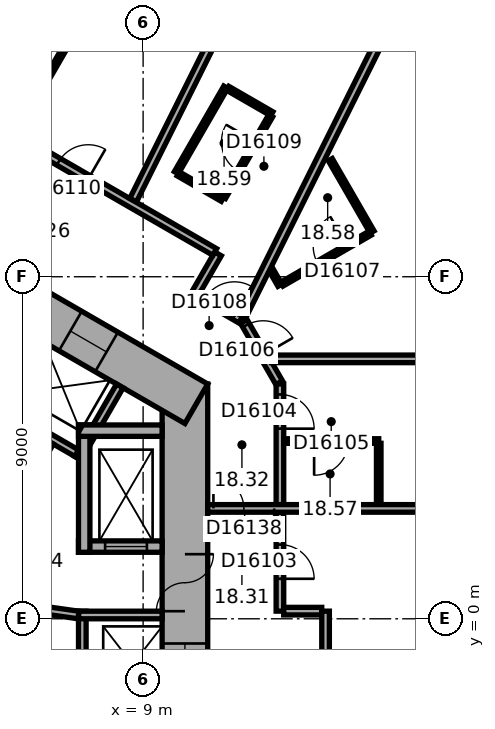
"""IFC4 building model, lengths in metres.
Left out: names, types, materials, properties, quantities, classifications, styles, units other than length and angle.
Written with IfcOpenShell. Run it as: python <this file> out.ifc"""

import sys

from ifc_helpers import new_model, si_unit, direction, frame, frame_2d, origin, place, context, subcontext, project, spatial, rectangle, extrude, element, fill, save


model = new_model("IFC4")
c1 = context("Model", 3, precision=1e-05, world=origin(), true_north=direction((0.0, 1.0)))
c2 = subcontext(c1, "Body", "Model", "MODEL_VIEW")
j1 = project(units=[si_unit("LENGTHUNIT", "METRE"), si_unit("PLANEANGLEUNIT", "RADIAN")], contexts=[c1])
p1 = place(None, origin())
s1 = spatial("IfcSite", under=j1, at=p1, CompositionType="ELEMENT")
p2 = place(p1, origin())
s2 = spatial("IfcBuilding", under=s1, at=p2, CompositionType="ELEMENT")
p3 = place(p2, frame((0.0, 0.0, 83.6)))
s3 = spatial("IfcBuildingStorey", under=s2, at=p3, CompositionType="ELEMENT", Elevation=83.6)
p4 = place(p3, frame((10.1, -6.177, 0.0), z_axis=(0.0, 0.0, 1.0), x_axis=(0.0, 1.0, 0.0)))
e1 = element("IfcWall", 1, at=p4, inside=s3, PredefinedType="SHEAR", context=c2, shape_type="SweptSolid", body=[
    extrude(rectangle(XDim=12.355, YDim=1.2, at=frame_2d((6.177, 0.0))), origin(), (0.0, 0.0, 1.0), 3.3),
])
p5 = place(p4, frame((6.378, 0.0, 0.0)))
e2 = element("IfcOpeningElement", 2, at=p5, cuts=e1, PredefinedType="OPENING", context=c2, shape_type="SweptSolid", body=[
    extrude(rectangle(XDim=1.5, YDim=2.1, at=frame_2d((0.75, 1.05))), frame((0.0, 0.61, 0.0), z_axis=(0.0, -1.0, 0.0), x_axis=(1.0, 0.0, 0.0)), (0.0, 0.0, 1.0), 1.22),
])
p6 = place(p4, frame((1.828, 0.0, 0.0)))
e3 = element("IfcOpeningElement", 3, at=p6, cuts=e1, PredefinedType="OPENING", context=c2, shape_type="SweptSolid", body=[
    extrude(rectangle(XDim=1.1, YDim=2.1, at=frame_2d((0.55, 1.05))), frame((0.0, 0.61, 0.0), z_axis=(0.0, -1.0, 0.0), x_axis=(1.0, 0.0, 0.0)), (0.0, 0.0, 1.0), 1.22),
])
p7 = place(p4, frame((4.427, 0.0, 0.0)))
e4 = element("IfcOpeningElement", 4, at=p7, cuts=e1, PredefinedType="OPENING", context=c2, shape_type="SweptSolid", body=[
    extrude(rectangle(XDim=1.1, YDim=2.1, at=frame_2d((0.55, 1.05))), frame((0.0, 0.61, 0.0), z_axis=(0.0, -1.0, 0.0), x_axis=(1.0, 0.0, 0.0)), (0.0, 0.0, 1.0), 1.22),
])
p8 = place(p3, frame((10.4, 5.658, 0.0), z_axis=(0.0, 0.0, 1.0), x_axis=(-0.866021384402, 0.500006961711, 0.0)))
e5 = element("IfcWall", 5, at=p8, inside=s3, PredefinedType="SHEAR", context=c2, shape_type="SweptSolid", body=[
    extrude(rectangle(XDim=12.355, YDim=1.2, at=frame_2d((6.178, 0.0))), origin(), (0.0, 0.0, 1.0), 3.3),
])
p9 = place(p8, frame((2.728, 0.0, 0.0)))
e6 = element("IfcOpeningElement", 6, at=p9, cuts=e5, PredefinedType="OPENING", context=c2, shape_type="SweptSolid", body=[
    extrude(rectangle(XDim=1.1, YDim=2.1, at=frame_2d((0.55, 1.05))), frame((0.0, 0.61, 0.0), z_axis=(0.0, -1.0, 0.0), x_axis=(1.0, 0.0, 0.0)), (0.0, 0.0, 1.0), 1.22),
])
p10 = place(p8, frame((5.328, 0.0, 0.0)))
e7 = element("IfcOpeningElement", 7, at=p10, cuts=e5, PredefinedType="OPENING", context=c2, shape_type="SweptSolid", body=[
    extrude(rectangle(XDim=1.1, YDim=2.1, at=frame_2d((0.55, 1.05))), frame((0.0, 0.61, 0.0), z_axis=(0.0, -1.0, 0.0), x_axis=(1.0, 0.0, 0.0)), (0.0, 0.0, 1.0), 1.22),
])
p11 = place(p8, frame((7.928, 0.0, 0.0)))
e8 = element("IfcOpeningElement", 8, at=p11, cuts=e5, PredefinedType="OPENING", context=c2, shape_type="SweptSolid", body=[
    extrude(rectangle(XDim=1.1, YDim=2.1, at=frame_2d((0.55, 1.05))), frame((0.0, 0.61, 0.0), z_axis=(0.0, -1.0, 0.0), x_axis=(1.0, 0.0, 0.0)), (0.0, 0.0, 1.0), 1.22),
])
p12 = place(p3, frame((7.4, -5.2, 0.0), z_axis=(0.0, 0.0, 1.0), x_axis=(0.0, 1.0, 0.0)))
e9 = element("IfcWall", 9, at=p12, inside=s3, PredefinedType="PARTITIONING", context=c2, shape_type="SweptSolid", body=[
    extrude(rectangle(XDim=5.4, YDim=0.2, at=frame_2d((2.7, 0.0))), origin(), (0.0, 0.0, 1.0), 3.05),
])
p13 = place(p3, frame((7.3, 0.1, 0.0), z_axis=(0.0, 0.0, 1.0), x_axis=(1.0, 0.0, 0.0)))
e10 = element("IfcWall", 10, at=p13, inside=s3, PredefinedType="PARTITIONING", context=c2, shape_type="SweptSolid", body=[
    extrude(rectangle(XDim=2.2, YDim=0.2, at=frame_2d((1.1, 0.0))), origin(), (0.0, 0.0, 1.0), 3.05),
])
p14 = place(p3, frame((7.424, 4.259, 0.0), z_axis=(0.0, 0.0, 1.0), x_axis=(-0.866026010844, 0.49999894854, 0.0)))
e11 = element("IfcWall", 11, at=p14, inside=s3, PredefinedType="PARTITIONING", context=c2, shape_type="SweptSolid", body=[
    extrude(rectangle(XDim=8.0, YDim=0.2, at=frame_2d((4.0, 0.0))), origin(), (0.0, 0.0, 1.0), 3.05),
])
p15 = place(p3, frame((7.287, 4.222, 0.0), z_axis=(0.0, 0.0, 1.0), x_axis=(0.499946605688, 0.86605622881, 0.0)))
e12 = element("IfcWall", 12, at=p15, inside=s3, PredefinedType="PARTITIONING", context=c2, shape_type="SweptSolid", body=[
    extrude(rectangle(XDim=2.2, YDim=0.2, at=frame_2d((1.1, 0.0))), origin(), (0.0, 0.0, 1.0), 3.05),
])
p16 = place(p3, frame((4.158, 0.602, 0.0), z_axis=(0.0, 0.0, 1.0), x_axis=(0.499977259774, 0.866038532462, 0.0)))
e13 = element("IfcWall", 13, at=p16, inside=s3, PredefinedType="SHEAR", context=c2, shape_type="SweptSolid", body=[
    extrude(rectangle(XDim=4.7, YDim=0.3, at=frame_2d((2.35, 0.0))), origin(), (0.0, 0.0, 1.0), 3.05),
])
p17 = place(p16, frame((0.8, 0.0, 0.0)))
e14 = element("IfcOpeningElement", 14, at=p17, cuts=e13, PredefinedType="OPENING", context=c2, shape_type="SweptSolid", body=[
    extrude(rectangle(XDim=1.2, YDim=2.1, at=frame_2d((0.6, 1.05))), frame((0.0, 0.16, 0.0), z_axis=(0.0, -1.0, 0.0), x_axis=(1.0, 0.0, 0.0)), (0.0, 0.0, 1.0), 0.32),
])
p18 = place(p3, frame((4.816, -0.222, 0.0), z_axis=(0.0, 0.0, 1.0), x_axis=(0.499977259774, -0.866038532462, 0.0)))
e15 = element("IfcWall", 15, at=p18, inside=s3, PredefinedType="SHEAR", context=c2, shape_type="SweptSolid", body=[
    extrude(rectangle(XDim=4.7, YDim=0.3, at=frame_2d((2.35, 0.0))), origin(), (0.0, 0.0, 1.0), 3.05),
])
p19 = place(p3, frame((7.3, 1.9, 0.0), z_axis=(0.0, 0.0, 1.0), x_axis=(1.0, 0.0, 0.0)))
e16 = element("IfcWall", 16, at=p19, inside=s3, PredefinedType="SHEAR", context=c2, shape_type="SweptSolid", body=[
    extrude(rectangle(XDim=2.2, YDim=0.3, at=frame_2d((1.1, 0.0))), origin(), (0.0, 0.0, 1.0), 3.05),
])
p20 = place(p19, frame((0.7, 0.0, 0.0)))
e17 = element("IfcOpeningElement", 17, at=p20, cuts=e16, PredefinedType="OPENING", context=c2, shape_type="SweptSolid", body=[
    extrude(rectangle(XDim=1.1, YDim=2.1, at=frame_2d((0.55, 1.05))), frame((0.0, 0.16, 0.0), z_axis=(0.0, -1.0, 0.0), x_axis=(1.0, 0.0, 0.0)), (0.0, 0.0, 1.0), 0.32),
])
p21 = place(p3, frame((7.45, 1.75, 0.0), z_axis=(0.0, 0.0, 1.0), x_axis=(0.0, 1.0, 0.0)))
e18 = element("IfcWall", 18, at=p21, inside=s3, PredefinedType="SHEAR", context=c2, shape_type="SweptSolid", body=[
    extrude(rectangle(XDim=3.35, YDim=0.3, at=frame_2d((1.675, 0.0))), origin(), (0.0, 0.0, 1.0), 3.05),
])
p22 = place(p3, frame((7.3, 4.95, 0.0), z_axis=(0.0, 0.0, 1.0), x_axis=(1.0, 0.0, 0.0)))
e19 = element("IfcWall", 19, at=p22, inside=s3, PredefinedType="SHEAR", context=c2, shape_type="SweptSolid", body=[
    extrude(rectangle(XDim=2.2, YDim=0.3, at=frame_2d((1.1, 0.0))), origin(), (0.0, 0.0, 1.0), 3.05),
])
p23 = place(p3, frame((4.327, 0.521, 0.0), z_axis=(0.0, 0.0, 1.0), x_axis=(0.990124376366, -0.14019172346, 0.0)))
e20 = element("IfcWall", 20, at=p23, inside=s3, PredefinedType="PARTITIONING", context=c2, shape_type="SweptSolid", body=[
    extrude(rectangle(XDim=3.002, YDim=0.2, at=frame_2d((1.501, 0.0))), origin(), (0.0, 0.0, 1.0), 3.05),
])
p24 = place(p23, frame((1.15, 0.0, 0.0)))
e21 = element("IfcOpeningElement", 21, at=p24, cuts=e20, PredefinedType="OPENING", context=c2, shape_type="SweptSolid", body=[
    extrude(rectangle(XDim=0.9, YDim=2.1, at=frame_2d((0.45, 1.05))), frame((0.0, 0.11, 0.0), z_axis=(0.0, -1.0, 0.0), x_axis=(1.0, 0.0, 0.0)), (0.0, 0.0, 1.0), 0.22),
])
p25 = place(p3, frame((6.971, 15.075, 0.0), z_axis=(0.0, 0.0, 1.0), x_axis=(-0.500007957085, -0.86602080971, 0.0)))
e22 = element("IfcWall", 22, at=p25, inside=s3, PredefinedType="PARTITIONING", context=c2, shape_type="SweptSolid", body=[
    extrude(rectangle(XDim=2.64, YDim=0.12, at=frame_2d((1.32, 0.0))), origin(), (0.0, 0.0, 1.0), 3.05),
])
p26 = place(p3, frame((9.875, 11.736, 0.0), z_axis=(0.0, 0.0, 1.0), x_axis=(0.499936506574, 0.866062058628, 0.0)))
e23 = element("IfcWall", 23, at=p26, inside=s3, PredefinedType="PARTITIONING", context=c2, shape_type="SweptSolid", body=[
    extrude(rectangle(XDim=2.6, YDim=0.12, at=frame_2d((1.3, 0.0))), origin(), (0.0, 0.0, 1.0), 3.05),
])
p27 = place(p3, frame((10.371, 8.561, 0.0), z_axis=(0.0, 0.0, 1.0), x_axis=(0.499986357472, 0.866033280158, 0.0)))
e24 = element("IfcWall", 24, at=p27, inside=s3, PredefinedType="PARTITIONING", context=c2, shape_type="SweptSolid", body=[
    extrude(rectangle(XDim=1.201, YDim=0.2, at=frame_2d((0.601, 0.0))), origin(), (0.0, 0.0, 1.0), 3.05),
])
p28 = place(p3, frame((10.885, 9.652, 0.0), z_axis=(0.0, 0.0, 1.0), x_axis=(-0.866033277307, 0.499986362411, 0.0)))
e25 = element("IfcWall", 25, at=p28, inside=s3, PredefinedType="PARTITIONING", context=c2, shape_type="SweptSolid", body=[
    extrude(rectangle(XDim=8.702, YDim=0.2, at=frame_2d((4.351, 0.0))), origin(), (0.0, 0.0, 1.0), 3.05),
])
p29 = place(p28, frame((3.844, 0.0, 0.0)))
e26 = element("IfcOpeningElement", 26, at=p29, cuts=e25, PredefinedType="OPENING", context=c2, shape_type="SweptSolid", body=[
    extrude(rectangle(XDim=0.9, YDim=2.1, at=frame_2d((0.45, 1.05))), frame((0.0, 0.11, 0.0), z_axis=(0.0, -1.0, 0.0), x_axis=(1.0, 0.0, 0.0)), (0.0, 0.0, 1.0), 0.22),
])
for number, where, z_axis, x_axis in (
    (27, (11.087, 11.036, 0.0), (0.0, 0.0, 1.0), (-0.866, 0.5, 0.0)),
    (28, (11.226, 13.958, 0.0), (0.0, 0.0, 1.0), (0.866, -0.5, 0.0)),
):
    element("IfcWall", number, at=place(p3, frame(where, z_axis=z_axis, x_axis=x_axis)), inside=s3, PredefinedType="PARTITIONING", context=c2, shape_type="SweptSolid", body=[
        extrude(rectangle(XDim=1.34, YDim=0.12, at=frame_2d((0.67, 0.0))), origin(), (0.0, 0.0, 1.0), 3.05),
    ])
p30 = place(p3, frame((11.566, 7.871, 0.0), z_axis=(0.0, 0.0, 1.0), x_axis=(-0.866004557827, 0.500036104519, 0.0)))
e29 = element("IfcWall", 29, at=p30, inside=s3, PredefinedType="PARTITIONING", context=c2, shape_type="SweptSolid", body=[
    extrude(rectangle(XDim=1.28, YDim=0.2, at=frame_2d((0.64, 0.0))), origin(), (0.0, 0.0, 1.0), 3.05),
])
p31 = place(p30, frame((0.19, 0.0, 0.0)))
e30 = element("IfcOpeningElement", 30, at=p31, cuts=e29, PredefinedType="OPENING", context=c2, shape_type="SweptSolid", body=[
    extrude(rectangle(XDim=0.9, YDim=2.1, at=frame_2d((0.45, 1.05))), frame((0.0, 0.11, 0.0), z_axis=(0.0, -1.0, 0.0), x_axis=(1.0, 0.0, 0.0)), (0.0, 0.0, 1.0), 0.22),
])
p32 = place(p3, frame((12.357, 13.236, 0.0), z_axis=(0.0, 0.0, 1.0), x_axis=(-0.50000366821, -0.866023285932, 0.0)))
e31 = element("IfcWall", 31, at=p32, inside=s3, PredefinedType="PARTITIONING", context=c2, shape_type="SweptSolid", body=[
    extrude(rectangle(XDim=2.48, YDim=0.12, at=frame_2d((1.24, 0.0))), origin(), (0.0, 0.0, 1.0), 3.05),
])
p33 = place(p32, frame((0.79, 0.0, 0.0)))
e32 = element("IfcOpeningElement", 32, at=p33, cuts=e31, PredefinedType="OPENING", context=c2, shape_type="SweptSolid", body=[
    extrude(rectangle(XDim=0.9, YDim=2.1, at=frame_2d((0.45, 1.05))), frame((0.0, 0.07, 0.0), z_axis=(0.0, -1.0, 0.0), x_axis=(1.0, 0.0, 0.0)), (0.0, 0.0, 1.0), 0.14),
])
p34 = place(p3, frame((12.393, 18.348, 0.0), z_axis=(0.0, 0.0, 1.0), x_axis=(-0.446176022699, -0.894945225569, 0.0)))
e33 = element("IfcWall", 33, at=p34, inside=s3, PredefinedType="PARTITIONING", context=c2, shape_type="SweptSolid", body=[
    extrude(rectangle(XDim=8.191, YDim=0.2, at=frame_2d((4.095, 0.0))), origin(), (0.0, 0.0, 1.0), 2.6),
])
p35 = place(p3, frame((12.58, 6.212, 0.0), z_axis=(0.0, 0.0, 1.0), x_axis=(-0.500063286585, 0.865988862174, 0.0)))
e34 = element("IfcWall", 34, at=p35, inside=s3, PredefinedType="PARTITIONING", context=c2, shape_type="SweptSolid", body=[
    extrude(rectangle(XDim=1.86, YDim=0.2, at=frame_2d((0.93, 0.0))), origin(), (0.0, 0.0, 1.0), 3.05),
])
p36 = place(p35, frame((0.842, 0.0, 0.0)))
e35 = element("IfcOpeningElement", 35, at=p36, cuts=e34, PredefinedType="OPENING", context=c2, shape_type="SweptSolid", body=[
    extrude(rectangle(XDim=0.9, YDim=2.1, at=frame_2d((0.45, 1.05))), frame((0.0, 0.11, 0.0), z_axis=(0.0, -1.0, 0.0), x_axis=(1.0, 0.0, 0.0)), (0.0, 0.0, 1.0), 0.22),
])
p37 = place(p3, frame((12.6, 0.201, 0.0), z_axis=(0.0, 0.0, 1.0), x_axis=(0.0, 1.0, 0.0)))
e36 = element("IfcWall", 36, at=p37, inside=s3, PredefinedType="PARTITIONING", context=c2, shape_type="SweptSolid", body=[
    extrude(rectangle(XDim=2.604, YDim=0.2, at=frame_2d((1.302, 0.0))), origin(), (0.0, 0.0, 1.0), 3.05),
])
p38 = place(p37, frame((0.852, 0.0, 0.0)))
e37 = element("IfcOpeningElement", 37, at=p38, cuts=e36, PredefinedType="OPENING", context=c2, shape_type="SweptSolid", body=[
    extrude(rectangle(XDim=0.9, YDim=2.1, at=frame_2d((0.45, 1.05))), frame((0.0, 0.11, 0.0), z_axis=(0.0, -1.0, 0.0), x_axis=(1.0, 0.0, 0.0)), (0.0, 0.0, 1.0), 0.22),
])
p39 = place(p3, frame((12.6, 3.004, 0.0), z_axis=(0.0, 0.0, 1.0), x_axis=(0.0, 1.0, 0.0)))
e38 = element("IfcWall", 38, at=p39, inside=s3, PredefinedType="PARTITIONING", context=c2, shape_type="SweptSolid", body=[
    extrude(rectangle(XDim=3.173, YDim=0.2, at=frame_2d((1.586, 0.0))), origin(), (0.0, 0.0, 1.0), 3.05),
])
p40 = place(p39, frame((1.998, 0.0, 0.0)))
e39 = element("IfcOpeningElement", 39, at=p40, cuts=e38, PredefinedType="OPENING", context=c2, shape_type="SweptSolid", body=[
    extrude(rectangle(XDim=0.9, YDim=2.1, at=frame_2d((0.45, 1.05))), frame((0.0, 0.11, 0.0), z_axis=(0.0, -1.0, 0.0), x_axis=(1.0, 0.0, 0.0)), (0.0, 0.0, 1.0), 0.22),
])
p41 = place(p3, frame((12.601, 8.776, 0.0), z_axis=(0.0, 0.0, 1.0), x_axis=(-0.500166486798, 0.865929261247, 0.0)))
e40 = element("IfcWall", 40, at=p41, inside=s3, PredefinedType="PARTITIONING", context=c2, shape_type="SweptSolid", body=[
    extrude(rectangle(XDim=0.476, YDim=0.12, at=frame_2d((0.238, 0.0))), origin(), (0.0, 0.0, 1.0), 3.05),
])
p42 = place(p3, frame((12.7, 4.677, 0.0), z_axis=(0.0, 0.0, 1.0), x_axis=(1.0, 0.0, 0.0)))
e41 = element("IfcWall", 41, at=p42, inside=s3, PredefinedType="PARTITIONING", context=c2, shape_type="SweptSolid", body=[
    extrude(rectangle(XDim=2.5, YDim=0.12, at=frame_2d((1.25, 0.0))), origin(), (0.0, 0.0, 1.0), 3.05),
])
p43 = place(p42, frame((0.8, 0.0, 0.0)))
e42 = element("IfcOpeningElement", 42, at=p43, cuts=e41, PredefinedType="OPENING", context=c2, shape_type="SweptSolid", body=[
    extrude(rectangle(XDim=0.9, YDim=2.1, at=frame_2d((0.45, 1.05))), frame((0.0, 0.07, 0.0), z_axis=(0.0, -1.0, 0.0), x_axis=(1.0, 0.0, 0.0)), (0.0, 0.0, 1.0), 0.14),
])
p44 = place(p3, frame((13.701, 0.201, 0.0), z_axis=(0.0, 0.0, 1.0), x_axis=(-1.0, 0.0, 0.0)))
e43 = element("IfcWall", 43, at=p44, inside=s3, PredefinedType="PARTITIONING", context=c2, shape_type="SweptSolid", body=[
    extrude(rectangle(XDim=1.001, YDim=0.2, at=frame_2d((0.5, 0.0))), origin(), (0.0, 0.0, 1.0), 3.05),
])
p45 = place(p3, frame((13.801, -5.501, 0.0), z_axis=(0.0, 0.0, 1.0), x_axis=(0.0, 1.0, 0.0)))
e44 = element("IfcWall", 44, at=p45, inside=s3, PredefinedType="PARTITIONING", context=c2, shape_type="SweptSolid", body=[
    extrude(rectangle(XDim=5.702, YDim=0.2, at=frame_2d((2.851, 0.0))), origin(), (0.0, 0.0, 1.0), 3.05),
])
p46 = place(p45, frame((3.296, 0.0, 0.0)))
e45 = element("IfcOpeningElement", 45, at=p46, cuts=e44, PredefinedType="OPENING", context=c2, shape_type="SweptSolid", body=[
    extrude(rectangle(XDim=0.9, YDim=2.1, at=frame_2d((0.45, 1.05))), frame((0.0, 0.11, 0.0), z_axis=(0.0, -1.0, 0.0), x_axis=(1.0, 0.0, 0.0)), (0.0, 0.0, 1.0), 0.22),
])
p47 = place(p3, frame((13.926, 12.081, 0.0), z_axis=(0.0, 0.0, 1.0), x_axis=(0.499994660107, -0.866028486751, 0.0)))
e46 = element("IfcWall", 46, at=p47, inside=s3, PredefinedType="PARTITIONING", context=c2, shape_type="SweptSolid", body=[
    extrude(rectangle(XDim=2.2, YDim=0.12, at=frame_2d((1.1, 0.0))), origin(), (0.0, 0.0, 1.0), 3.05),
])
p48 = place(p3, frame((14.974, 10.146, 0.0), z_axis=(0.0, 0.0, 1.0), x_axis=(-0.86599746015, -0.500048396672, 0.0)))
e47 = element("IfcWall", 47, at=p48, inside=s3, PredefinedType="PARTITIONING", context=c2, shape_type="SweptSolid", body=[
    extrude(rectangle(XDim=2.68, YDim=0.12, at=frame_2d((1.34, 0.0))), origin(), (0.0, 0.0, 1.0), 3.05),
])
p49 = place(p48, frame((0.69, 0.0, 0.0)))
e48 = element("IfcOpeningElement", 48, at=p49, cuts=e47, PredefinedType="OPENING", context=c2, shape_type="SweptSolid", body=[
    extrude(rectangle(XDim=0.9, YDim=2.1, at=frame_2d((0.45, 1.05))), frame((0.0, 0.07, 0.0), z_axis=(0.0, -1.0, 0.0), x_axis=(1.0, 0.0, 0.0)), (0.0, 0.0, 1.0), 0.14),
])
p50 = place(p3, frame((15.2, 4.618, 0.0), z_axis=(0.0, 0.0, 1.0), x_axis=(0.0, -1.0, 0.0)))
e49 = element("IfcWall", 49, at=p50, inside=s3, PredefinedType="PARTITIONING", context=c2, shape_type="SweptSolid", body=[
    extrude(rectangle(XDim=1.613, YDim=0.12, at=frame_2d((0.807, 0.0))), origin(), (0.0, 0.0, 1.0), 3.05),
])
p51 = place(p3, frame((15.915, 16.592, 0.0), z_axis=(0.0, 0.0, 1.0), x_axis=(-0.446199736347, -0.894933402709, 0.0)))
e50 = element("IfcWall", 50, at=p51, inside=s3, PredefinedType="PARTITIONING", context=c2, shape_type="SweptSolid", body=[
    extrude(rectangle(XDim=9.635, YDim=0.2, at=frame_2d((4.817, 0.0))), origin(), (0.0, 0.0, 1.0), 3.05),
])
p52 = place(p3, frame((21.95, 2.905, 0.0), z_axis=(0.0, 0.0, 1.0), x_axis=(-1.0, 0.0, 0.0)))
e51 = element("IfcWall", 51, at=p52, inside=s3, PredefinedType="PARTITIONING", context=c2, shape_type="SweptSolid", body=[
    extrude(rectangle(XDim=11.25, YDim=0.2, at=frame_2d((5.625, 0.0))), origin(), (0.0, 0.0, 1.0), 3.05),
])
p53 = place(p52, frame((9.5, 0.0, 0.0)))
e52 = element("IfcOpeningElement", 52, at=p53, cuts=e51, PredefinedType="OPENING", context=c2, shape_type="SweptSolid", body=[
    extrude(rectangle(XDim=1.6, YDim=2.1, at=frame_2d((0.8, 1.05))), frame((0.0, 0.11, 0.0), z_axis=(0.0, -1.0, 0.0), x_axis=(1.0, 0.0, 0.0)), (0.0, 0.0, 1.0), 0.22),
])
p54 = place(p3, frame((21.95, 6.839, 0.0), z_axis=(0.0, 0.0, 1.0), x_axis=(-1.0, 0.0, 0.0)))
e53 = element("IfcWall", 53, at=p54, inside=s3, PredefinedType="PARTITIONING", context=c2, shape_type="SweptSolid", body=[
    extrude(rectangle(XDim=9.572, YDim=0.2, at=frame_2d((4.786, 0.0))), origin(), (0.0, 0.0, 1.0), 3.05),
])
p55 = place(p5, origin())
e54 = element("IfcDoor", 54, at=p55, inside=s3, OperationType="DOUBLE_DOOR_SINGLE_SWING", PredefinedType="DOOR", context=c2, shape_type="SweptSolid", body=[
    extrude(rectangle(XDim=1.5, YDim=2.1, at=frame_2d((0.75, 1.05))), frame((0.0, 0.025, 0.0), z_axis=(0.0, -1.0, 0.0), x_axis=(1.0, 0.0, 0.0)), (0.0, 0.0, 1.0), 0.05),
])
fill(e2, e54)
p56 = place(p20, origin())
e55 = element("IfcDoor", 55, at=p56, inside=s3, OperationType="DOUBLE_DOOR_SLIDING", PredefinedType="DOOR", context=c2, shape_type="SweptSolid", body=[
    extrude(rectangle(XDim=1.1, YDim=2.1, at=frame_2d((0.55, 1.05))), frame((0.0, 0.025, 0.0), z_axis=(0.0, -1.0, 0.0), x_axis=(1.0, 0.0, 0.0)), (0.0, 0.0, 1.0), 0.05),
])
fill(e17, e55)
p57 = place(p7, origin())
e56 = element("IfcDoor", 56, at=p57, inside=s3, OperationType="DOUBLE_DOOR_SLIDING", PredefinedType="DOOR", context=c2, shape_type="SweptSolid", body=[
    extrude(rectangle(XDim=1.1, YDim=2.1, at=frame_2d((0.55, 1.05))), frame((0.0, 0.025, 0.0), z_axis=(0.0, -1.0, 0.0), x_axis=(1.0, 0.0, 0.0)), (0.0, 0.0, 1.0), 0.05),
])
fill(e4, e56)
p58 = place(p9, origin())
e57 = element("IfcDoor", 57, at=p58, inside=s3, OperationType="DOUBLE_DOOR_SLIDING", PredefinedType="DOOR", context=c2, shape_type="SweptSolid", body=[
    extrude(rectangle(XDim=1.1, YDim=2.1, at=frame_2d((0.55, 1.05))), frame((0.0, 0.025, 0.0), z_axis=(0.0, -1.0, 0.0), x_axis=(1.0, 0.0, 0.0)), (0.0, 0.0, 1.0), 0.05),
])
fill(e6, e57)
p59 = place(p38, origin())
e58 = element("IfcDoor", 58, at=p59, inside=s3, OperationType="SINGLE_SWING_LEFT", PredefinedType="DOOR", context=c2, shape_type="SweptSolid", body=[
    extrude(rectangle(XDim=0.9, YDim=2.1, at=frame_2d((0.45, 1.05))), frame((0.0, 0.025, 0.0), z_axis=(0.0, -1.0, 0.0), x_axis=(1.0, 0.0, 0.0)), (0.0, 0.0, 1.0), 0.05),
])
fill(e37, e58)
p60 = place(p40, origin())
e59 = element("IfcDoor", 59, at=p60, inside=s3, OperationType="SINGLE_SWING_LEFT", PredefinedType="DOOR", context=c2, shape_type="SweptSolid", body=[
    extrude(rectangle(XDim=0.9, YDim=2.1, at=frame_2d((0.45, 1.05))), frame((0.0, 0.025, 0.0), z_axis=(0.0, -1.0, 0.0), x_axis=(1.0, 0.0, 0.0)), (0.0, 0.0, 1.0), 0.05),
])
fill(e39, e59)
p61 = place(p43, origin())
e60 = element("IfcDoor", 60, at=p61, inside=s3, OperationType="SINGLE_SWING_LEFT", PredefinedType="DOOR", context=c2, shape_type="SweptSolid", body=[
    extrude(rectangle(XDim=0.9, YDim=2.1, at=frame_2d((0.45, 1.05))), frame((0.0, 0.025, 0.0), z_axis=(0.0, -1.0, 0.0), x_axis=(1.0, 0.0, 0.0)), (0.0, 0.0, 1.0), 0.05),
])
fill(e42, e60)
p62 = place(p36, origin())
e61 = element("IfcDoor", 61, at=p62, inside=s3, OperationType="SINGLE_SWING_LEFT", PredefinedType="DOOR", context=c2, shape_type="SweptSolid", body=[
    extrude(rectangle(XDim=0.9, YDim=2.1, at=frame_2d((0.45, 1.05))), frame((0.0, 0.025, 0.0), z_axis=(0.0, -1.0, 0.0), x_axis=(1.0, 0.0, 0.0)), (0.0, 0.0, 1.0), 0.05),
])
fill(e35, e61)
p63 = place(p49, origin())
e62 = element("IfcDoor", 62, at=p63, inside=s3, OperationType="SINGLE_SWING_LEFT", PredefinedType="DOOR", context=c2, shape_type="SweptSolid", body=[
    extrude(rectangle(XDim=0.9, YDim=2.1, at=frame_2d((0.45, 1.05))), frame((0.0, 0.025, 0.0), z_axis=(0.0, -1.0, 0.0), x_axis=(1.0, 0.0, 0.0)), (0.0, 0.0, 1.0), 0.05),
])
fill(e48, e62)
p64 = place(p31, origin())
e63 = element("IfcDoor", 63, at=p64, inside=s3, OperationType="SINGLE_SWING_LEFT", PredefinedType="DOOR", context=c2, shape_type="SweptSolid", body=[
    extrude(rectangle(XDim=0.9, YDim=2.1, at=frame_2d((0.45, 1.05))), frame((0.0, 0.025, 0.0), z_axis=(0.0, -1.0, 0.0), x_axis=(1.0, 0.0, 0.0)), (0.0, 0.0, 1.0), 0.05),
])
fill(e30, e63)
p65 = place(p33, origin())
e64 = element("IfcDoor", 64, at=p65, inside=s3, OperationType="SINGLE_SWING_LEFT", PredefinedType="DOOR", context=c2, shape_type="SweptSolid", body=[
    extrude(rectangle(XDim=0.9, YDim=2.1, at=frame_2d((0.45, 1.05))), frame((0.0, 0.025, 0.0), z_axis=(0.0, -1.0, 0.0), x_axis=(1.0, 0.0, 0.0)), (0.0, 0.0, 1.0), 0.05),
])
fill(e32, e64)
p66 = place(p29, origin())
e65 = element("IfcDoor", 65, at=p66, inside=s3, OperationType="SINGLE_SWING_LEFT", PredefinedType="DOOR", context=c2, shape_type="SweptSolid", body=[
    extrude(rectangle(XDim=0.9, YDim=2.1, at=frame_2d((0.45, 1.05))), frame((0.0, 0.025, 0.0), z_axis=(0.0, -1.0, 0.0), x_axis=(1.0, 0.0, 0.0)), (0.0, 0.0, 1.0), 0.05),
])
fill(e26, e65)
p67 = place(p53, origin())
e66 = element("IfcDoor", 66, at=p67, inside=s3, OperationType="DOUBLE_DOOR_SINGLE_SWING", PredefinedType="DOOR", context=c2, shape_type="SweptSolid", body=[
    extrude(rectangle(XDim=1.6, YDim=2.1, at=frame_2d((0.8, 1.05))), frame((0.0, 0.025, 0.0), z_axis=(0.0, -1.0, 0.0), x_axis=(1.0, 0.0, 0.0)), (0.0, 0.0, 1.0), 0.05),
])
fill(e52, e66)
save(model, sys.argv[1])
